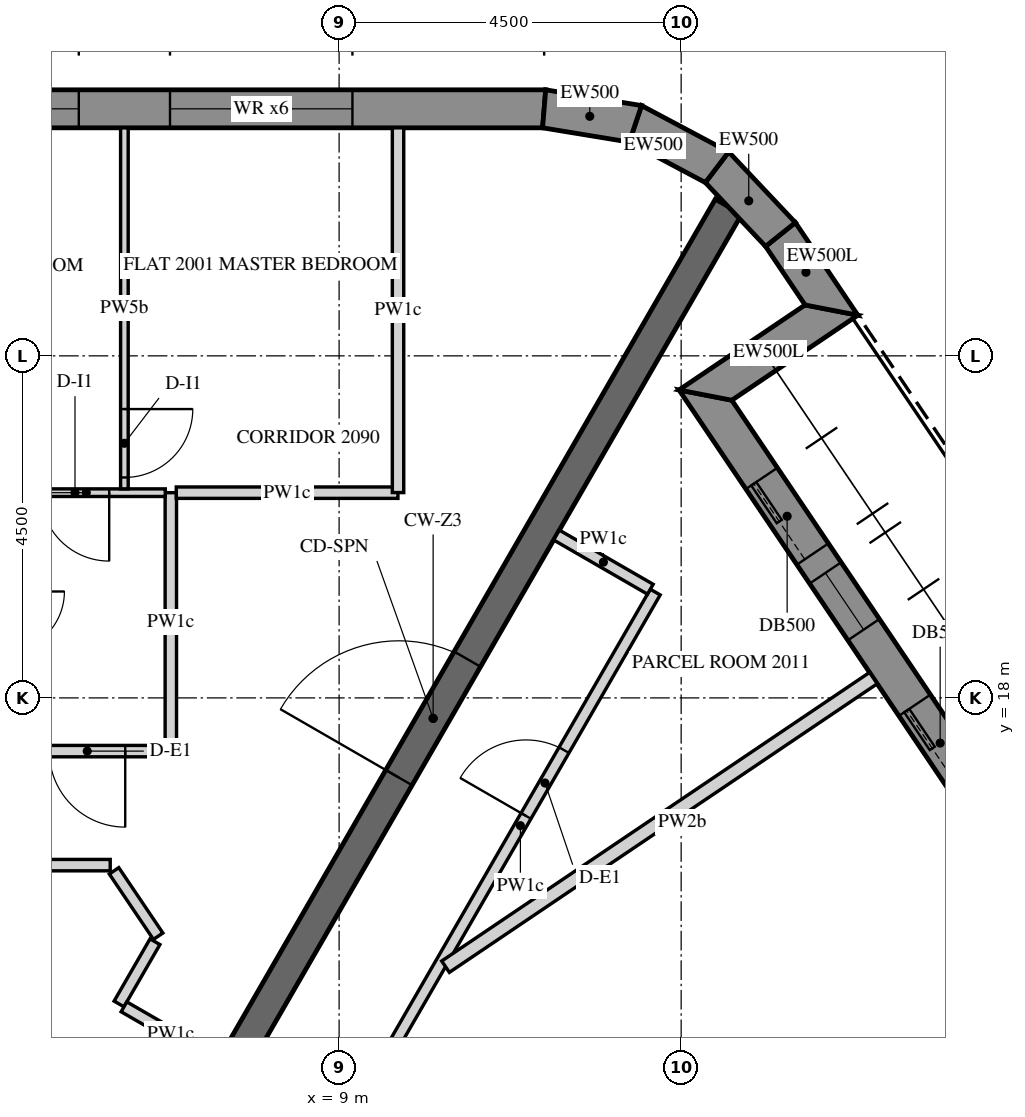
"""IFC4 building model, lengths in metres.
Left out: names, types, materials, properties, quantities, classifications, styles, units other than length and angle.
Written with IfcOpenShell. Run it as: python <this file> out.ifc"""

import sys

from ifc_helpers import new_model, si_unit, direction, frame, frame_2d, origin, place, context, subcontext, project, spatial, polyline, rectangle, outline, extrude, element, fill, save


model = new_model("IFC4")
c1 = context("Model", 3, precision=1e-05, world=origin(), true_north=direction((0.0, 1.0)))
c2 = subcontext(c1, "Body", "Model", "MODEL_VIEW")
j1 = project(units=[si_unit("LENGTHUNIT", "METRE"), si_unit("PLANEANGLEUNIT", "RADIAN")], contexts=[c1])
p1 = place(None, origin())
s1 = spatial("IfcSite", under=j1, at=p1, CompositionType="ELEMENT")
p2 = place(p1, origin())
s2 = spatial("IfcBuilding", under=s1, at=p2, CompositionType="ELEMENT")
p3 = place(p2, frame((0.0, 0.0, 260.1)))
s3 = spatial("IfcBuildingStorey", under=s2, at=p3, CompositionType="ELEMENT", Elevation=260.1)
p4 = place(p3, frame((11.698, 25.75, -0.15), z_axis=(0.0, 0.0, 1.0), x_axis=(-1.0, 0.0, 0.0)))
e1 = element("IfcWall", 1, at=p4, inside=s3, PredefinedType="SOLIDWALL", context=c2, shape_type="SweptSolid", body=[
    extrude(outline(polyline([(-0.021, -0.25), (25.468, -0.25), (25.421, 0.25), (0.021, 0.25), (-0.021, -0.25)])), origin(), (0.0, 0.0, 1.0), 3.9),
])
p5 = place(p4, frame((2.522, 0.0, 0.75)))
e2 = element("IfcOpeningElement", 2, at=p5, cuts=e1, PredefinedType="OPENING", context=c2, shape_type="SweptSolid", body=[
    extrude(rectangle(XDim=2.4, YDim=2.7, at=frame_2d((1.2, 1.35))), frame((0.0, 0.26, 0.0), z_axis=(0.0, -1.0, 0.0), x_axis=(1.0, 0.0, 0.0)), (0.0, 0.0, 1.0), 0.52),
])
p6 = place(p4, frame((6.122, 0.0, 0.75)))
e3 = element("IfcOpeningElement", 3, at=p6, cuts=e1, PredefinedType="OPENING", context=c2, shape_type="SweptSolid", body=[
    extrude(rectangle(XDim=2.4, YDim=2.7, at=frame_2d((1.2, 1.35))), frame((0.0, 0.26, 0.0), z_axis=(0.0, -1.0, 0.0), x_axis=(1.0, 0.0, 0.0)), (0.0, 0.0, 1.0), 0.52),
])
p7 = place(p4, frame((9.722, 0.0, 0.75)))
e4 = element("IfcOpeningElement", 4, at=p7, cuts=e1, PredefinedType="OPENING", context=c2, shape_type="SweptSolid", body=[
    extrude(rectangle(XDim=2.4, YDim=2.7, at=frame_2d((1.2, 1.35))), frame((0.0, 0.26, 0.0), z_axis=(0.0, -1.0, 0.0), x_axis=(1.0, 0.0, 0.0)), (0.0, 0.0, 1.0), 0.52),
])
p8 = place(p4, frame((13.323, 0.0, 0.75)))
e5 = element("IfcOpeningElement", 5, at=p8, cuts=e1, PredefinedType="OPENING", context=c2, shape_type="SweptSolid", body=[
    extrude(rectangle(XDim=2.4, YDim=2.7, at=frame_2d((1.2, 1.35))), frame((0.0, 0.26, 0.0), z_axis=(0.0, -1.0, 0.0), x_axis=(1.0, 0.0, 0.0)), (0.0, 0.0, 1.0), 0.52),
])
p9 = place(p4, frame((16.922, 0.0, 0.75)))
e6 = element("IfcOpeningElement", 6, at=p9, cuts=e1, PredefinedType="OPENING", context=c2, shape_type="SweptSolid", body=[
    extrude(rectangle(XDim=2.4, YDim=2.7, at=frame_2d((1.2, 1.35))), frame((0.0, 0.26, 0.0), z_axis=(0.0, -1.0, 0.0), x_axis=(1.0, 0.0, 0.0)), (0.0, 0.0, 1.0), 0.52),
])
p10 = place(p4, frame((20.522, 0.0, 0.75)))
e7 = element("IfcOpeningElement", 7, at=p10, cuts=e1, PredefinedType="OPENING", context=c2, shape_type="SweptSolid", body=[
    extrude(rectangle(XDim=2.4, YDim=2.7, at=frame_2d((1.2, 1.35))), frame((0.0, 0.26, 0.0), z_axis=(0.0, -1.0, 0.0), x_axis=(1.0, 0.0, 0.0)), (0.0, 0.0, 1.0), 0.52),
])
p11 = place(p3, frame((26.706, 2.879, -0.15), z_axis=(0.0, 0.0, 1.0), x_axis=(-0.559197891507, 0.829034208061, 0.0)))
e8 = element("IfcWall", 8, at=p11, inside=s3, PredefinedType="SOLIDWALL", context=c2, shape_type="SweptSolid", body=[
    extrude(outline(polyline([(0.25, -0.25), (22.795, -0.25), (23.295, 0.25), (-0.25, 0.25), (0.25, -0.25)])), origin(), (0.0, 0.0, 1.0), 3.9),
])
p12 = place(p11, frame((1.323, 0.0, 1.05)))
e9 = element("IfcOpeningElement", 9, at=p12, cuts=e8, PredefinedType="OPENING", context=c2, shape_type="SweptSolid", body=[
    extrude(rectangle(XDim=0.9, YDim=1.5, at=frame_2d((0.45, 0.75))), frame((0.0, 0.26, 0.0), z_axis=(0.0, -1.0, 0.0), x_axis=(1.0, 0.0, 0.0)), (0.0, 0.0, 1.0), 0.52),
])
p13 = place(p11, frame((2.522, 0.0, 0.15)))
e10 = element("IfcOpeningElement", 10, at=p13, cuts=e8, PredefinedType="OPENING", context=c2, shape_type="SweptSolid", body=[
    extrude(rectangle(XDim=1.2, YDim=2.4, at=frame_2d((0.6, 1.2))), frame((0.0, 0.26, 0.0), z_axis=(0.0, -1.0, 0.0), x_axis=(1.0, 0.0, 0.0)), (0.0, 0.0, 1.0), 0.52),
])
p14 = place(p11, frame((4.922, 0.0, 1.05)))
e11 = element("IfcOpeningElement", 11, at=p14, cuts=e8, PredefinedType="OPENING", context=c2, shape_type="SweptSolid", body=[
    extrude(rectangle(XDim=0.9, YDim=1.5, at=frame_2d((0.45, 0.75))), frame((0.0, 0.26, 0.0), z_axis=(0.0, -1.0, 0.0), x_axis=(1.0, 0.0, 0.0)), (0.0, 0.0, 1.0), 0.52),
])
p15 = place(p11, frame((6.122, 0.0, 0.15)))
e12 = element("IfcOpeningElement", 12, at=p15, cuts=e8, PredefinedType="OPENING", context=c2, shape_type="SweptSolid", body=[
    extrude(rectangle(XDim=1.2, YDim=2.4, at=frame_2d((0.6, 1.2))), frame((0.0, 0.26, 0.0), z_axis=(0.0, -1.0, 0.0), x_axis=(1.0, 0.0, 0.0)), (0.0, 0.0, 1.0), 0.52),
])
p16 = place(p11, frame((8.522, 0.0, 1.05)))
e13 = element("IfcOpeningElement", 13, at=p16, cuts=e8, PredefinedType="OPENING", context=c2, shape_type="SweptSolid", body=[
    extrude(rectangle(XDim=0.9, YDim=1.5, at=frame_2d((0.45, 0.75))), frame((0.0, 0.26, 0.0), z_axis=(0.0, -1.0, 0.0), x_axis=(1.0, 0.0, 0.0)), (0.0, 0.0, 1.0), 0.52),
])
p17 = place(p11, frame((9.722, 0.0, 0.15)))
e14 = element("IfcOpeningElement", 14, at=p17, cuts=e8, PredefinedType="OPENING", context=c2, shape_type="SweptSolid", body=[
    extrude(rectangle(XDim=1.2, YDim=2.4, at=frame_2d((0.6, 1.2))), frame((0.0, 0.26, 0.0), z_axis=(0.0, -1.0, 0.0), x_axis=(1.0, 0.0, 0.0)), (0.0, 0.0, 1.0), 0.52),
])
p18 = place(p11, frame((12.122, 0.0, 1.05)))
e15 = element("IfcOpeningElement", 15, at=p18, cuts=e8, PredefinedType="OPENING", context=c2, shape_type="SweptSolid", body=[
    extrude(rectangle(XDim=0.9, YDim=1.5, at=frame_2d((0.45, 0.75))), frame((0.0, 0.26, 0.0), z_axis=(0.0, -1.0, 0.0), x_axis=(1.0, 0.0, 0.0)), (0.0, 0.0, 1.0), 0.52),
])
p19 = place(p11, frame((13.323, 0.0, 0.15)))
e16 = element("IfcOpeningElement", 16, at=p19, cuts=e8, PredefinedType="OPENING", context=c2, shape_type="SweptSolid", body=[
    extrude(rectangle(XDim=1.2, YDim=2.4, at=frame_2d((0.6, 1.2))), frame((0.0, 0.26, 0.0), z_axis=(0.0, -1.0, 0.0), x_axis=(1.0, 0.0, 0.0)), (0.0, 0.0, 1.0), 0.52),
])
p20 = place(p11, frame((15.722, 0.0, 1.05)))
e17 = element("IfcOpeningElement", 17, at=p20, cuts=e8, PredefinedType="OPENING", context=c2, shape_type="SweptSolid", body=[
    extrude(rectangle(XDim=0.9, YDim=1.5, at=frame_2d((0.45, 0.75))), frame((0.0, 0.26, 0.0), z_axis=(0.0, -1.0, 0.0), x_axis=(1.0, 0.0, 0.0)), (0.0, 0.0, 1.0), 0.52),
])
p21 = place(p11, frame((16.922, 0.0, 0.15)))
e18 = element("IfcOpeningElement", 18, at=p21, cuts=e8, PredefinedType="OPENING", context=c2, shape_type="SweptSolid", body=[
    extrude(rectangle(XDim=1.2, YDim=2.4, at=frame_2d((0.6, 1.2))), frame((0.0, 0.26, 0.0), z_axis=(0.0, -1.0, 0.0), x_axis=(1.0, 0.0, 0.0)), (0.0, 0.0, 1.0), 0.52),
])
p22 = place(p11, frame((19.323, 0.0, 1.05)))
e19 = element("IfcOpeningElement", 19, at=p22, cuts=e8, PredefinedType="OPENING", context=c2, shape_type="SweptSolid", body=[
    extrude(rectangle(XDim=0.9, YDim=1.5, at=frame_2d((0.45, 0.75))), frame((0.0, 0.26, 0.0), z_axis=(0.0, -1.0, 0.0), x_axis=(1.0, 0.0, 0.0)), (0.0, 0.0, 1.0), 0.52),
])
p23 = place(p11, frame((20.522, 0.0, 0.15)))
e20 = element("IfcOpeningElement", 20, at=p23, cuts=e8, PredefinedType="OPENING", context=c2, shape_type="SweptSolid", body=[
    extrude(rectangle(XDim=1.2, YDim=2.4, at=frame_2d((0.6, 1.2))), frame((0.0, 0.26, 0.0), z_axis=(0.0, -1.0, 0.0), x_axis=(1.0, 0.0, 0.0)), (0.0, 0.0, 1.0), 0.52),
])
p24 = place(p3, frame((13.819, 21.984, -0.15), z_axis=(0.0, 0.0, 1.0), x_axis=(0.829052389485, 0.559170935841, 0.0)))
e21 = element("IfcWall", 21, at=p24, inside=s3, PredefinedType="SOLIDWALL", context=c2, shape_type="SweptSolid", body=[
    extrude(outline(polyline([(0.25, -0.25), (2.25, -0.25), (1.75, 0.25), (-0.25, 0.25), (0.25, -0.25)])), origin(), (0.0, 0.0, 1.0), 3.9),
])
p25 = place(p3, frame((15.478, 23.102, -0.15), z_axis=(0.0, 0.0, 1.0), x_axis=(-0.559245726333, 0.829001940636, 0.0)))
e22 = element("IfcWall", 22, at=p25, inside=s3, PredefinedType="SOLIDWALL", context=c2, shape_type="SweptSolid", body=[
    extrude(outline(polyline([(-0.25, -0.25), (1.221, -0.25), (1.18, 0.25), (0.25, 0.25), (-0.25, -0.25)])), origin(), (0.0, 0.0, 1.0), 3.9),
])
p26 = place(p3, frame((14.806, 24.097, -0.15), z_axis=(0.0, 0.0, 1.0), x_axis=(-0.686234452793, 0.727380420275, 0.0)))
e23 = element("IfcWall", 23, at=p26, inside=s3, PredefinedType="SOLIDWALL", context=c2, shape_type="SweptSolid", body=[
    extrude(outline(polyline([(-0.021, -0.25), (1.257, -0.25), (1.175, 0.25), (0.021, 0.25), (-0.021, -0.25)])), origin(), (0.0, 0.0, 1.0), 3.9),
])
p27 = place(p3, frame((13.972, 24.982, -0.15), z_axis=(0.0, 0.0, 1.0), x_axis=(-0.882902492938, 0.469556373575, 0.0)))
e24 = element("IfcWall", 24, at=p27, inside=s3, PredefinedType="SOLIDWALL", context=c2, shape_type="SweptSolid", body=[
    extrude(outline(polyline([(-0.041, -0.25), (1.257, -0.25), (1.175, 0.25), (0.041, 0.25), (-0.041, -0.25)])), origin(), (0.0, 0.0, 1.0), 3.9),
])
p28 = place(p3, frame((12.898, 25.553, -0.15), z_axis=(0.0, 0.0, 1.0), x_axis=(-0.986765617372, 0.16215306464, 0.0)))
e25 = element("IfcWall", 25, at=p28, inside=s3, PredefinedType="SOLIDWALL", context=c2, shape_type="SweptSolid", body=[
    extrude(outline(polyline([(-0.041, -0.25), (1.237, -0.25), (1.196, 0.25), (0.041, 0.25), (-0.041, -0.25)])), origin(), (0.0, 0.0, 1.0), 3.9),
])
p29 = place(p3, frame((6.351, 11.0, -0.15), z_axis=(0.0, 0.0, 1.0), x_axis=(0.499998894578, 0.866026041999, 0.0)))
e26 = element("IfcWall", 26, at=p29, inside=s3, PredefinedType="SHEAR", context=c2, shape_type="SweptSolid", body=[
    extrude(rectangle(XDim=15.544, YDim=0.4, at=frame_2d((7.772, 0.0))), origin(), (0.0, 0.0, 1.0), 3.9),
])
p30 = place(p29, frame((6.872, 0.0, 0.15)))
e27 = element("IfcOpeningElement", 27, at=p30, cuts=e26, PredefinedType="OPENING", context=c2, shape_type="SweptSolid", body=[
    extrude(rectangle(XDim=1.8, YDim=2.4, at=frame_2d((0.9, 1.2))), frame((0.0, 0.21, 0.0), z_axis=(0.0, -1.0, 0.0), x_axis=(1.0, 0.0, 0.0)), (0.0, 0.0, 1.0), 0.42),
])
p31 = place(p3, frame((6.711, 17.3, 0.0), z_axis=(0.0, 0.0, 1.0), x_axis=(-1.0, 0.0, 0.0)))
e28 = element("IfcWall", 28, at=p31, inside=s3, PredefinedType="PARTITIONING", context=c2, shape_type="SweptSolid", body=[
    extrude(rectangle(XDim=15.296, YDim=0.15, at=frame_2d((7.648, 0.0))), origin(), (0.0, 0.0, 1.0), 2.823),
])
p32 = place(p31, frame((0.525, 0.0, 0.0)))
e29 = element("IfcOpeningElement", 29, at=p32, cuts=e28, PredefinedType="OPENING", context=c2, shape_type="SweptSolid", body=[
    extrude(rectangle(XDim=1.0, YDim=2.1, at=frame_2d((0.5, 1.05))), frame((0.0, 0.085, 0.0), z_axis=(0.0, -1.0, 0.0), x_axis=(1.0, 0.0, 0.0)), (0.0, 0.0, 1.0), 0.17),
])
p33 = place(p31, frame((13.936, 0.0, 0.0)))
e30 = element("IfcOpeningElement", 30, at=p33, cuts=e28, PredefinedType="OPENING", context=c2, shape_type="SweptSolid", body=[
    extrude(rectangle(XDim=1.0, YDim=2.1, at=frame_2d((0.5, 1.05))), frame((0.0, 0.085, 0.0), z_axis=(0.0, -1.0, 0.0), x_axis=(1.0, 0.0, 0.0)), (0.0, 0.0, 1.0), 0.17),
])
p34 = place(p3, frame((6.786, 20.7, 0.0), z_axis=(0.0, 0.0, 1.0), x_axis=(0.0, -1.0, 0.0)))
e31 = element("IfcWall", 31, at=p34, inside=s3, PredefinedType="PARTITIONING", context=c2, shape_type="SweptSolid", body=[
    extrude(rectangle(XDim=3.4, YDim=0.15, at=frame_2d((1.7, 0.0))), origin(), (0.0, 0.0, 1.0), 2.823),
])
p35 = place(p3, frame((9.774, 20.7, 0.0), z_axis=(0.0, 0.0, 1.0), x_axis=(-1.0, 0.0, 0.0)))
e32 = element("IfcWall", 32, at=p35, inside=s3, PredefinedType="PARTITIONING", context=c2, shape_type="SweptSolid", body=[
    extrude(rectangle(XDim=2.916, YDim=0.15, at=frame_2d((1.458, 0.0))), origin(), (0.0, 0.0, 1.0), 2.823),
])
p36 = place(p3, frame((9.775, 25.5, 0.0), z_axis=(0.0, 0.0, 1.0), x_axis=(0.0, -1.0, 0.0)))
e33 = element("IfcWall", 33, at=p36, inside=s3, PredefinedType="PARTITIONING", context=c2, shape_type="SweptSolid", body=[
    extrude(rectangle(XDim=4.799, YDim=0.15, at=frame_2d((2.399, 0.0))), origin(), (0.0, 0.0, 1.0), 2.823),
])
p37 = place(p3, frame((-7.564, 15.8, 0.0), z_axis=(0.0, 0.0, 1.0), x_axis=(1.0, 0.0, 0.0)))
e34 = element("IfcWall", 34, at=p37, inside=s3, PredefinedType="PARTITIONING", context=c2, shape_type="SweptSolid", body=[
    extrude(rectangle(XDim=13.553, YDim=0.15, at=frame_2d((6.776, 0.0))), origin(), (0.0, 0.0, 1.0), 2.823),
])
p38 = place(p37, frame((6.326, 0.0, 0.0)))
e35 = element("IfcOpeningElement", 35, at=p38, cuts=e34, PredefinedType="OPENING", context=c2, shape_type="SweptSolid", body=[
    extrude(rectangle(XDim=0.9, YDim=2.1, at=frame_2d((0.45, 1.05))), frame((0.0, 0.085, 0.0), z_axis=(0.0, -1.0, 0.0), x_axis=(1.0, 0.0, 0.0)), (0.0, 0.0, 1.0), 0.17),
])
p39 = place(p3, frame((6.039, 15.725, 0.0), z_axis=(0.0, 0.0, 1.0), x_axis=(0.559307154107, -0.828960498073, 0.0)))
e36 = element("IfcWall", 36, at=p39, inside=s3, PredefinedType="PARTITIONING", context=c2, shape_type="SweptSolid", body=[
    extrude(rectangle(XDim=1.038, YDim=0.15, at=frame_2d((0.519, 0.0))), origin(), (0.0, 0.0, 1.0), 2.823),
])
p40 = place(p3, frame((6.578, 14.793, 0.0), z_axis=(0.0, 0.0, 1.0), x_axis=(-0.499998034377, -0.866026538634, 0.0)))
e37 = element("IfcWall", 37, at=p40, inside=s3, PredefinedType="PARTITIONING", context=c2, shape_type="SweptSolid", body=[
    extrude(rectangle(XDim=0.946, YDim=0.15, at=frame_2d((0.473, 0.0))), origin(), (0.0, 0.0, 1.0), 2.823),
])
p41 = place(p3, frame((6.17, 13.936, 0.0), z_axis=(0.0, 0.0, 1.0), x_axis=(0.865988727248, -0.500063520245, 0.0)))
e38 = element("IfcWall", 38, at=p41, inside=s3, PredefinedType="PARTITIONING", context=c2, shape_type="SweptSolid", body=[
    extrude(rectangle(XDim=1.425, YDim=0.15, at=frame_2d((0.712, 0.0))), origin(), (0.0, 0.0, 1.0), 2.823),
])
p42 = place(p3, frame((9.611, 13.246, 0.0), z_axis=(0.0, 0.0, 1.0), x_axis=(0.499994435258, 0.866028616566, 0.0)))
e39 = element("IfcWall", 39, at=p42, inside=s3, PredefinedType="PARTITIONING", context=c2, shape_type="SweptSolid", body=[
    extrude(rectangle(XDim=7.097, YDim=0.15, at=frame_2d((3.548, 0.0))), origin(), (0.0, 0.0, 1.0), 2.823),
])
p43 = place(p42, frame((3.696, 0.0, 0.0)))
e40 = element("IfcOpeningElement", 40, at=p43, cuts=e39, PredefinedType="OPENING", context=c2, shape_type="SweptSolid", body=[
    extrude(rectangle(XDim=1.0, YDim=2.1, at=frame_2d((0.5, 1.05))), frame((0.0, 0.085, 0.0), z_axis=(0.0, -1.0, 0.0), x_axis=(1.0, 0.0, 0.0)), (0.0, 0.0, 1.0), 0.17),
])
p44 = place(p3, frame((13.094, 19.43, 0.0), z_axis=(0.0, 0.0, 1.0), x_axis=(-0.866062911188, 0.499935029643, 0.0)))
e41 = element("IfcWall", 41, at=p44, inside=s3, PredefinedType="PARTITIONING", context=c2, shape_type="SweptSolid", body=[
    extrude(rectangle(XDim=1.425, YDim=0.15, at=frame_2d((0.712, 0.0))), origin(), (0.0, 0.0, 1.0), 2.823),
])
p45 = place(p3, frame((6.713, 20.7, 0.0), z_axis=(0.0, 0.0, 1.0), x_axis=(-1.0, 0.0, 0.0)))
e42 = element("IfcWall", 42, at=p45, inside=s3, PredefinedType="PARTITIONING", context=c2, shape_type="SweptSolid", body=[
    extrude(rectangle(XDim=2.079, YDim=0.1, at=frame_2d((1.04, 0.0))), origin(), (0.0, 0.0, 1.0), 2.823),
])
p46 = place(p45, frame((0.738, 0.0, 0.0)))
e43 = element("IfcOpeningElement", 43, at=p46, cuts=e42, PredefinedType="OPENING", context=c2, shape_type="SweptSolid", body=[
    extrude(rectangle(XDim=0.9, YDim=2.1, at=frame_2d((0.45, 1.05))), frame((0.0, 0.06, 0.0), z_axis=(0.0, -1.0, 0.0), x_axis=(1.0, 0.0, 0.0)), (0.0, 0.0, 1.0), 0.12),
])
p47 = place(p3, frame((6.175, 25.5, 0.0), z_axis=(0.0, 0.0, 1.0), x_axis=(0.0, -1.0, 0.0)))
e44 = element("IfcWall", 44, at=p47, inside=s3, PredefinedType="PARTITIONING", context=c2, shape_type="SweptSolid", body=[
    extrude(rectangle(XDim=4.75, YDim=0.1, at=frame_2d((2.375, 0.0))), origin(), (0.0, 0.0, 1.0), 2.823),
])
p48 = place(p47, frame((3.7, 0.0, 0.0)))
e45 = element("IfcOpeningElement", 45, at=p48, cuts=e44, PredefinedType="OPENING", context=c2, shape_type="SweptSolid", body=[
    extrude(rectangle(XDim=0.9, YDim=2.1, at=frame_2d((0.45, 1.05))), frame((0.0, 0.06, 0.0), z_axis=(0.0, -1.0, 0.0), x_axis=(1.0, 0.0, 0.0)), (0.0, 0.0, 1.0), 0.12),
])
p49 = place(p3, frame((16.029, 18.26, 0.0), z_axis=(0.0, 0.0, 1.0), x_axis=(-0.82904538001, -0.559181328268, 0.0)))
e46 = element("IfcWall", 46, at=p49, inside=s3, PredefinedType="PARTITIONING", context=c2, shape_type="SweptSolid", body=[
    extrude(rectangle(XDim=6.79, YDim=0.18, at=frame_2d((3.395, 0.0))), origin(), (0.0, 0.0, 1.0), 2.823),
])
p50 = place(p5, frame((0.0, 0.18, 0.0)))
e47 = element("IfcWindow", 47, at=p50, inside=s3, PartitioningType="DOUBLE_PANEL_VERTICAL", PredefinedType="WINDOW", context=c2, shape_type="SweptSolid", body=[
    extrude(rectangle(XDim=2.4, YDim=2.7, at=frame_2d((1.2, 1.35))), frame((0.0, 0.03, 0.0), z_axis=(0.0, -1.0, 0.0), x_axis=(1.0, 0.0, 0.0)), (0.0, 0.0, 1.0), 0.06),
])
fill(e2, e47)
p51 = place(p6, frame((0.0, 0.18, 0.0)))
e48 = element("IfcWindow", 48, at=p51, inside=s3, PartitioningType="DOUBLE_PANEL_VERTICAL", PredefinedType="WINDOW", context=c2, shape_type="SweptSolid", body=[
    extrude(rectangle(XDim=2.4, YDim=2.7, at=frame_2d((1.2, 1.35))), frame((0.0, 0.03, 0.0), z_axis=(0.0, -1.0, 0.0), x_axis=(1.0, 0.0, 0.0)), (0.0, 0.0, 1.0), 0.06),
])
fill(e3, e48)
p52 = place(p21, frame((0.0, 0.175, 0.0)))
e49 = element("IfcDoor", 49, at=p52, inside=s3, OperationType="SLIDING_TO_LEFT", PredefinedType="DOOR", context=c2, shape_type="SweptSolid", body=[
    extrude(rectangle(XDim=1.2, YDim=2.4, at=frame_2d((0.6, 1.2))), frame((0.0, 0.025, 0.0), z_axis=(0.0, -1.0, 0.0), x_axis=(1.0, 0.0, 0.0)), (0.0, 0.0, 1.0), 0.05),
])
fill(e18, e49)
p53 = place(p22, frame((0.0, 0.18, 0.0)))
e50 = element("IfcWindow", 50, at=p53, inside=s3, PartitioningType="SINGLE_PANEL", PredefinedType="WINDOW", context=c2, shape_type="SweptSolid", body=[
    extrude(rectangle(XDim=0.9, YDim=1.5, at=frame_2d((0.45, 0.75))), frame((0.0, 0.03, 0.0), z_axis=(0.0, -1.0, 0.0), x_axis=(1.0, 0.0, 0.0)), (0.0, 0.0, 1.0), 0.06),
])
fill(e19, e50)
p54 = place(p23, frame((0.0, 0.175, 0.0)))
e51 = element("IfcDoor", 51, at=p54, inside=s3, OperationType="SLIDING_TO_LEFT", PredefinedType="DOOR", context=c2, shape_type="SweptSolid", body=[
    extrude(rectangle(XDim=1.2, YDim=2.4, at=frame_2d((0.6, 1.2))), frame((0.0, 0.025, 0.0), z_axis=(0.0, -1.0, 0.0), x_axis=(1.0, 0.0, 0.0)), (0.0, 0.0, 1.0), 0.05),
])
fill(e20, e51)
p55 = place(p30, origin())
e52 = element("IfcDoor", 52, at=p55, inside=s3, OperationType="DOUBLE_DOOR_SINGLE_SWING", PredefinedType="DOOR", context=c2, shape_type="SweptSolid", body=[
    extrude(rectangle(XDim=1.8, YDim=2.4, at=frame_2d((0.9, 1.2))), frame((0.0, 0.025, 0.0), z_axis=(0.0, -1.0, 0.0), x_axis=(1.0, 0.0, 0.0)), (0.0, 0.0, 1.0), 0.05),
])
fill(e27, e52)
p56 = place(p32, origin())
e53 = element("IfcDoor", 53, at=p56, inside=s3, OperationType="SINGLE_SWING_RIGHT", PredefinedType="DOOR", context=c2, shape_type="SweptSolid", body=[
    extrude(rectangle(XDim=1.0, YDim=2.1, at=frame_2d((0.5, 1.05))), frame((0.0, 0.025, 0.0), z_axis=(0.0, -1.0, 0.0), x_axis=(1.0, 0.0, 0.0)), (0.0, 0.0, 1.0), 0.05),
])
fill(e29, e53)
p57 = place(p46, origin())
e54 = element("IfcDoor", 54, at=p57, inside=s3, OperationType="SINGLE_SWING_RIGHT", PredefinedType="DOOR", context=c2, shape_type="SweptSolid", body=[
    extrude(rectangle(XDim=0.9, YDim=2.1, at=frame_2d((0.45, 1.05))), frame((0.0, 0.025, 0.0), z_axis=(0.0, -1.0, 0.0), x_axis=(1.0, 0.0, 0.0)), (0.0, 0.0, 1.0), 0.05),
])
fill(e43, e54)
p58 = place(p48, origin())
e55 = element("IfcDoor", 55, at=p58, inside=s3, OperationType="SINGLE_SWING_RIGHT", PredefinedType="DOOR", context=c2, shape_type="SweptSolid", body=[
    extrude(rectangle(XDim=0.9, YDim=2.1, at=frame_2d((0.45, 1.05))), frame((0.0, 0.025, 0.0), z_axis=(0.0, -1.0, 0.0), x_axis=(1.0, 0.0, 0.0)), (0.0, 0.0, 1.0), 0.05),
])
fill(e45, e55)
p59 = place(p43, origin())
e56 = element("IfcDoor", 56, at=p59, inside=s3, OperationType="SINGLE_SWING_RIGHT", PredefinedType="DOOR", context=c2, shape_type="SweptSolid", body=[
    extrude(rectangle(XDim=1.0, YDim=2.1, at=frame_2d((0.5, 1.05))), frame((0.0, 0.025, 0.0), z_axis=(0.0, -1.0, 0.0), x_axis=(1.0, 0.0, 0.0)), (0.0, 0.0, 1.0), 0.05),
])
fill(e40, e56)
save(model, sys.argv[1])
